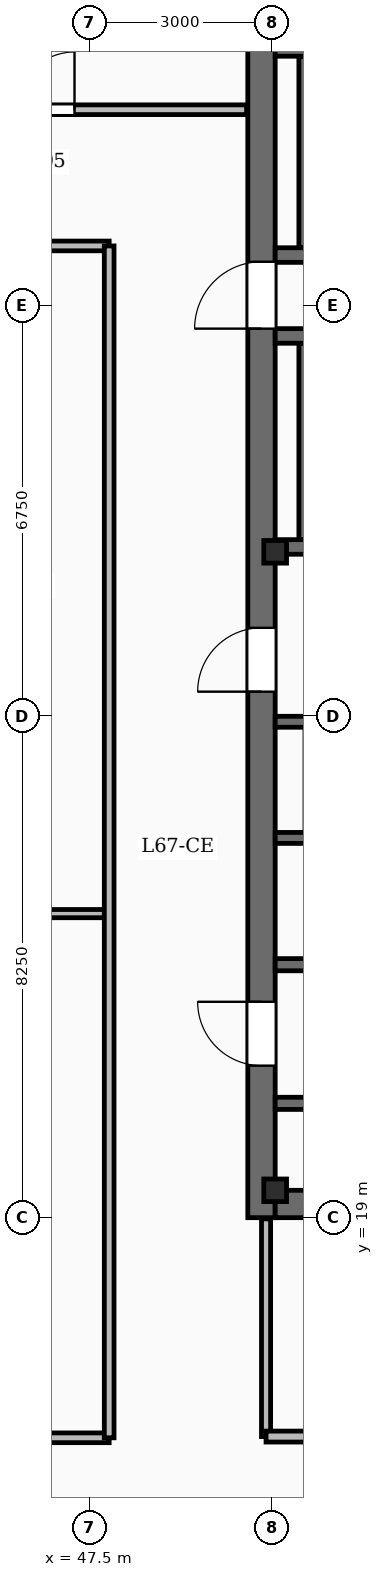
"""IFC4 building model, lengths in metres.
Left out: names, types, materials, properties, quantities, classifications, styles, units other than length and angle.
Written with IfcOpenShell. Run it as: python <this file> out.ifc"""

import sys

from ifc_helpers import new_model, si_unit, direction, frame, frame_2d, origin, origin_2d, place, context, subcontext, project, spatial, rectangle, i_section, extrude, element, fill, save


model = new_model("IFC4")
c1 = context("Model", 3, precision=1e-05, world=origin(), true_north=direction((0.0, 1.0)))
c2 = subcontext(c1, "Body", "Model", "MODEL_VIEW")
j1 = project(units=[si_unit("LENGTHUNIT", "METRE"), si_unit("PLANEANGLEUNIT", "RADIAN")], contexts=[c1])
p1 = place(None, origin())
s1 = spatial("IfcSite", under=j1, at=p1, CompositionType="ELEMENT")
p2 = place(p1, origin())
s2 = spatial("IfcBuilding", under=s1, at=p2, CompositionType="ELEMENT")
p3 = place(p2, frame((0.0, 0.0, 274.9)))
s3 = spatial("IfcBuildingStorey", under=s2, at=p3, CompositionType="ELEMENT", Elevation=274.9)
p4 = place(p3, frame((50.325, 19.0, -0.45), z_axis=(0.0, 0.0, 1.0), x_axis=(0.0, 1.0, 0.0)))
e1 = element("IfcWall", 1, at=p4, inside=s3, PredefinedType="SHEAR", context=c2, shape_type="SweptSolid", body=[
    extrude(rectangle(XDim=20.8, YDim=0.45, at=frame_2d((10.4, 0.0))), origin(), (0.0, 0.0, 1.0), 3.93),
])
p5 = place(p4, frame((2.5, 0.0, 0.45)))
e2 = element("IfcOpeningElement", 2, at=p5, cuts=e1, PredefinedType="OPENING", context=c2, shape_type="SweptSolid", body=[
    extrude(rectangle(XDim=1.05, YDim=2.15, at=frame_2d((0.525, 1.075))), frame((0.0, 0.235, 0.0), z_axis=(0.0, -1.0, 0.0), x_axis=(1.0, 0.0, 0.0)), (0.0, 0.0, 1.0), 0.47),
])
p6 = place(p4, frame((8.65, 0.0, 0.45)))
e3 = element("IfcOpeningElement", 3, at=p6, cuts=e1, PredefinedType="OPENING", context=c2, shape_type="SweptSolid", body=[
    extrude(rectangle(XDim=1.05, YDim=2.15, at=frame_2d((0.525, 1.075))), frame((0.0, 0.235, 0.0), z_axis=(0.0, -1.0, 0.0), x_axis=(1.0, 0.0, 0.0)), (0.0, 0.0, 1.0), 0.47),
])
p7 = place(p4, frame((14.62, 0.0, 0.45)))
e4 = element("IfcOpeningElement", 4, at=p7, cuts=e1, PredefinedType="OPENING", context=c2, shape_type="SweptSolid", body=[
    extrude(rectangle(XDim=1.1, YDim=2.15, at=frame_2d((0.55, 1.075))), frame((0.0, 0.235, 0.0), z_axis=(0.0, -1.0, 0.0), x_axis=(1.0, 0.0, 0.0)), (0.0, 0.0, 1.0), 0.47),
])
p8 = place(p3, frame((50.55, 19.225, -0.45), z_axis=(0.0, 0.0, 1.0), x_axis=(1.0, 0.0, 0.0)))
e5 = element("IfcWall", 5, at=p8, inside=s3, PredefinedType="SHEAR", context=c2, shape_type="SweptSolid", body=[
    extrude(rectangle(XDim=9.8, YDim=0.45, at=frame_2d((4.9, 0.0))), origin(), (0.0, 0.0, 1.0), 3.93),
])
for number, where, z_axis, x_axis in (
    (6, (50.55, 19.45, -0.45), (0.0, 0.0, 1.0), (1.0, 0.0, 0.0)),
    (7, (50.55, 29.95, -0.45), (0.0, 0.0, 1.0), (1.0, 0.0, 0.0)),
):
    element("IfcColumn", number, at=place(p3, frame(where, z_axis=z_axis, x_axis=x_axis)), inside=s3, PredefinedType="COLUMN", context=c2, shape_type="SweptSolid", body=[
        extrude(i_section(OverallWidth=0.374, OverallDepth=0.372, WebThickness=0.016, FlangeThickness=0.026, FilletRadius=0.02, at=origin_2d()), origin(), (0.0, 0.0, 1.0), 3.93),
    ])
p9 = place(p3, frame((60.35, 30.03, 0.0), z_axis=(0.0, 0.0, 1.0), x_axis=(-1.0, 0.0, 0.0)))
e8 = element("IfcWall", 8, at=p9, inside=s3, PredefinedType="SOLIDWALL", context=c2, shape_type="SweptSolid", body=[
    extrude(rectangle(XDim=9.8, YDim=0.24, at=frame_2d((4.9, 0.0))), origin(), (0.0, 0.0, 1.0), 3.48),
])
p10 = place(p9, frame((7.83, 0.0, 0.0)))
e9 = element("IfcOpeningElement", 9, at=p10, cuts=e8, PredefinedType="OPENING", context=c2, shape_type="SweptSolid", body=[
    extrude(rectangle(XDim=1.1, YDim=2.15, at=frame_2d((0.55, 1.075))), frame((0.0, 0.13, 0.0), z_axis=(0.0, -1.0, 0.0), x_axis=(1.0, 0.0, 0.0)), (0.0, 0.0, 1.0), 0.26),
])
p11 = place(p3, frame((50.55, 33.5, 0.0), z_axis=(0.0, 0.0, 1.0), x_axis=(1.0, 0.0, 0.0)))
e10 = element("IfcWall", 10, at=p11, inside=s3, PredefinedType="SOLIDWALL", context=c2, shape_type="SweptSolid", body=[
    extrude(rectangle(XDim=9.8, YDim=0.24, at=frame_2d((4.9, 0.0))), origin(), (0.0, 0.0, 1.0), 3.48),
])
p12 = place(p3, frame((51.06, 30.15, 0.0), z_axis=(0.0, 0.0, 1.0), x_axis=(0.0, 1.0, 0.0)))
e11 = element("IfcWall", 11, at=p12, inside=s3, PredefinedType="SOLIDWALL", context=c2, shape_type="SweptSolid", body=[
    extrude(rectangle(XDim=3.23, YDim=0.24, at=frame_2d((1.615, 0.0))), origin(), (0.0, 0.0, 1.0), 3.48),
])
p13 = place(p3, frame((60.35, 34.83, 0.0), z_axis=(0.0, 0.0, 1.0), x_axis=(-1.0, 0.0, 0.0)))
e12 = element("IfcWall", 12, at=p13, inside=s3, PredefinedType="SOLIDWALL", context=c2, shape_type="SweptSolid", body=[
    extrude(rectangle(XDim=9.8, YDim=0.24, at=frame_2d((4.9, 0.0))), origin(), (0.0, 0.0, 1.0), 3.48),
])
p14 = place(p13, frame((7.87, 0.0, 0.0)))
e13 = element("IfcOpeningElement", 13, at=p14, cuts=e12, PredefinedType="OPENING", context=c2, shape_type="SweptSolid", body=[
    extrude(rectangle(XDim=1.1, YDim=2.15, at=frame_2d((0.55, 1.075))), frame((0.0, 0.13, 0.0), z_axis=(0.0, -1.0, 0.0), x_axis=(1.0, 0.0, 0.0)), (0.0, 0.0, 1.0), 0.26),
])
p15 = place(p3, frame((50.55, 38.22, 0.0), z_axis=(0.0, 0.0, 1.0), x_axis=(1.0, 0.0, 0.0)))
e14 = element("IfcWall", 14, at=p15, inside=s3, PredefinedType="SOLIDWALL", context=c2, shape_type="SweptSolid", body=[
    extrude(rectangle(XDim=9.8, YDim=0.24, at=frame_2d((4.9, 0.0))), origin(), (0.0, 0.0, 1.0), 3.48),
])
p16 = place(p3, frame((51.06, 34.95, 0.0), z_axis=(0.0, 0.0, 1.0), x_axis=(0.0, 1.0, 0.0)))
e15 = element("IfcWall", 15, at=p16, inside=s3, PredefinedType="SOLIDWALL", context=c2, shape_type="SweptSolid", body=[
    extrude(rectangle(XDim=3.15, YDim=0.24, at=frame_2d((1.575, 0.0))), origin(), (0.0, 0.0, 1.0), 3.48),
])
p17 = place(p3, frame((50.55, 27.155, 0.0), z_axis=(0.0, 0.0, 1.0), x_axis=(1.0, 0.0, 0.0)))
e16 = element("IfcWall", 16, at=p17, inside=s3, PredefinedType="SOLIDWALL", context=c2, shape_type="SweptSolid", body=[
    extrude(rectangle(XDim=3.315, YDim=0.18, at=frame_2d((1.657, 0.0))), origin(), (0.0, 0.0, 1.0), 3.48),
])
p18 = place(p17, frame((1.235, 0.0, 0.0)))
e17 = element("IfcOpeningElement", 17, at=p18, cuts=e16, PredefinedType="OPENING", context=c2, shape_type="SweptSolid", body=[
    extrude(rectangle(XDim=1.35, YDim=2.3, at=frame_2d((0.675, 1.15))), frame((0.0, 0.1, 0.0), z_axis=(0.0, -1.0, 0.0), x_axis=(1.0, 0.0, 0.0)), (0.0, 0.0, 1.0), 0.2),
])
p19 = place(p3, frame((50.55, 25.245, 0.0), z_axis=(0.0, 0.0, 1.0), x_axis=(1.0, 0.0, 0.0)))
e18 = element("IfcWall", 18, at=p19, inside=s3, PredefinedType="SOLIDWALL", context=c2, shape_type="SweptSolid", body=[
    extrude(rectangle(XDim=3.315, YDim=0.18, at=frame_2d((1.657, 0.0))), origin(), (0.0, 0.0, 1.0), 3.48),
])
p20 = place(p3, frame((50.55, 20.88, 0.0), z_axis=(0.0, 0.0, 1.0), x_axis=(1.0, 0.0, 0.0)))
e19 = element("IfcWall", 19, at=p20, inside=s3, PredefinedType="SOLIDWALL", context=c2, shape_type="SweptSolid", body=[
    extrude(rectangle(XDim=9.8, YDim=0.2, at=frame_2d((4.9, 0.0))), origin(), (0.0, 0.0, 1.0), 2.54),
])
p21 = place(p20, frame((1.4, 0.0, 0.0)))
e20 = element("IfcOpeningElement", 20, at=p21, cuts=e19, PredefinedType="OPENING", context=c2, shape_type="SweptSolid", body=[
    extrude(rectangle(XDim=1.05, YDim=2.15, at=frame_2d((0.525, 1.075))), frame((0.0, 0.11, 0.0), z_axis=(0.0, -1.0, 0.0), x_axis=(1.0, 0.0, 0.0)), (0.0, 0.0, 1.0), 0.22),
])
p22 = place(p20, frame((5.5, 0.0, 0.0)))
e21 = element("IfcOpeningElement", 21, at=p22, cuts=e19, PredefinedType="OPENING", context=c2, shape_type="SweptSolid", body=[
    extrude(rectangle(XDim=1.05, YDim=2.15, at=frame_2d((0.525, 1.075))), frame((0.0, 0.11, 0.0), z_axis=(0.0, -1.0, 0.0), x_axis=(1.0, 0.0, 0.0)), (0.0, 0.0, 1.0), 0.22),
])
p23 = place(p3, frame((50.55, 23.16, 0.0), z_axis=(0.0, 0.0, 1.0), x_axis=(1.0, 0.0, 0.0)))
e22 = element("IfcWall", 22, at=p23, inside=s3, PredefinedType="SOLIDWALL", context=c2, shape_type="SweptSolid", body=[
    extrude(rectangle(XDim=3.33, YDim=0.2, at=frame_2d((1.665, 0.0))), origin(), (0.0, 0.0, 1.0), 2.54),
])
p24 = place(p23, frame((0.55, 0.0, 0.0)))
e23 = element("IfcOpeningElement", 23, at=p24, cuts=e22, PredefinedType="OPENING", context=c2, shape_type="SweptSolid", body=[
    extrude(rectangle(XDim=0.86, YDim=2.05, at=frame_2d((0.43, 1.025))), frame((0.0, 0.11, 0.0), z_axis=(0.0, -1.0, 0.0), x_axis=(1.0, 0.0, 0.0)), (0.0, 0.0, 1.0), 0.22),
])
p25 = place(p3, frame((50.4, 15.4, 0.0), z_axis=(0.0, 0.0, 1.0), x_axis=(1.0, 0.0, 0.0)))
e24 = element("IfcWall", 24, at=p25, inside=s3, PredefinedType="SOLIDWALL", context=c2, shape_type="SweptSolid", body=[
    extrude(rectangle(XDim=10.0, YDim=0.18, at=frame_2d((5.0, 0.0))), origin(), (0.0, 0.0, 1.0), 2.54),
])
p26 = place(p25, frame((1.19, 0.0, 0.0)))
e25 = element("IfcOpeningElement", 25, at=p26, cuts=e24, PredefinedType="OPENING", context=c2, shape_type="SweptSolid", body=[
    extrude(rectangle(XDim=0.92, YDim=2.1, at=frame_2d((0.46, 1.05))), frame((0.0, 0.1, 0.0), z_axis=(0.0, -1.0, 0.0), x_axis=(1.0, 0.0, 0.0)), (0.0, 0.0, 1.0), 0.2),
])
p27 = place(p25, frame((4.54, 0.0, 0.0)))
e26 = element("IfcOpeningElement", 26, at=p27, cuts=e24, PredefinedType="OPENING", context=c2, shape_type="SweptSolid", body=[
    extrude(rectangle(XDim=0.92, YDim=2.1, at=frame_2d((0.46, 1.05))), frame((0.0, 0.1, 0.0), z_axis=(0.0, -1.0, 0.0), x_axis=(1.0, 0.0, 0.0)), (0.0, 0.0, 1.0), 0.2),
])
p28 = place(p25, frame((7.92, 0.0, 0.0)))
e27 = element("IfcOpeningElement", 27, at=p28, cuts=e24, PredefinedType="OPENING", context=c2, shape_type="SweptSolid", body=[
    extrude(rectangle(XDim=0.86, YDim=2.05, at=frame_2d((0.43, 1.025))), frame((0.0, 0.1, 0.0), z_axis=(0.0, -1.0, 0.0), x_axis=(1.0, 0.0, 0.0)), (0.0, 0.0, 1.0), 0.2),
])
p29 = place(p3, frame((50.4, 15.4, 0.0), z_axis=(0.0, 0.0, 1.0), x_axis=(0.0, 1.0, 0.0)))
e28 = element("IfcWall", 28, at=p29, inside=s3, PredefinedType="PARTITIONING", context=c2, shape_type="SweptSolid", body=[
    extrude(rectangle(XDim=3.58, YDim=0.15, at=frame_2d((1.79, 0.0))), origin(), (0.0, 0.0, 1.0), 2.54),
])
p30 = place(p3, frame((24.82, 37.22, 0.0), z_axis=(0.0, 0.0, 1.0), x_axis=(1.0, 0.0, 0.0)))
e29 = element("IfcWall", 29, at=p30, inside=s3, PredefinedType="PARTITIONING", context=c2, shape_type="SweptSolid", body=[
    extrude(rectangle(XDim=25.26, YDim=0.16, at=frame_2d((12.63, 0.0))), origin(), (0.0, 0.0, 1.0), 2.54),
])
p31 = place(p30, frame((4.03, 0.0, 0.0)))
e30 = element("IfcOpeningElement", 30, at=p31, cuts=e29, PredefinedType="OPENING", context=c2, shape_type="SweptSolid", body=[
    extrude(rectangle(XDim=0.95, YDim=2.15, at=frame_2d((0.475, 1.075))), frame((0.0, 0.09, 0.0), z_axis=(0.0, -1.0, 0.0), x_axis=(1.0, 0.0, 0.0)), (0.0, 0.0, 1.0), 0.18),
])
p32 = place(p30, frame((13.355, 0.0, 0.0)))
e31 = element("IfcOpeningElement", 31, at=p32, cuts=e29, PredefinedType="OPENING", context=c2, shape_type="SweptSolid", body=[
    extrude(rectangle(XDim=0.95, YDim=2.15, at=frame_2d((0.475, 1.075))), frame((0.0, 0.09, 0.0), z_axis=(0.0, -1.0, 0.0), x_axis=(1.0, 0.0, 0.0)), (0.0, 0.0, 1.0), 0.18),
])
p33 = place(p30, frame((21.48, 0.0, 0.0)))
e32 = element("IfcOpeningElement", 32, at=p33, cuts=e29, PredefinedType="OPENING", context=c2, shape_type="SweptSolid", body=[
    extrude(rectangle(XDim=0.95, YDim=2.15, at=frame_2d((0.475, 1.075))), frame((0.0, 0.09, 0.0), z_axis=(0.0, -1.0, 0.0), x_axis=(1.0, 0.0, 0.0)), (0.0, 0.0, 1.0), 0.18),
])
p34 = place(p3, frame((27.08, 24.0, 0.0), z_axis=(0.0, 0.0, 1.0), x_axis=(1.0, 0.0, 0.0)))
e33 = element("IfcWall", 33, at=p34, inside=s3, PredefinedType="PARTITIONING", context=c2, shape_type="SweptSolid", body=[
    extrude(rectangle(XDim=20.74, YDim=0.135, at=frame_2d((10.37, 0.0))), origin(), (0.0, 0.0, 1.0), 2.54),
])
p35 = place(p3, frame((27.08, 34.98, 0.0), z_axis=(0.0, 0.0, 1.0), x_axis=(1.0, 0.0, 0.0)))
e34 = element("IfcWall", 34, at=p35, inside=s3, PredefinedType="PARTITIONING", context=c2, shape_type="SweptSolid", body=[
    extrude(rectangle(XDim=20.74, YDim=0.16, at=frame_2d((10.37, 0.0))), origin(), (0.0, 0.0, 1.0), 2.54),
])
p36 = place(p35, frame((0.995, 0.0, 0.0)))
e35 = element("IfcOpeningElement", 35, at=p36, cuts=e34, PredefinedType="OPENING", context=c2, shape_type="SweptSolid", body=[
    extrude(rectangle(XDim=0.95, YDim=2.15, at=frame_2d((0.475, 1.075))), frame((0.0, 0.09, 0.0), z_axis=(0.0, -1.0, 0.0), x_axis=(1.0, 0.0, 0.0)), (0.0, 0.0, 1.0), 0.18),
])
p37 = place(p35, frame((6.695, 0.0, 0.0)))
e36 = element("IfcOpeningElement", 36, at=p37, cuts=e34, PredefinedType="OPENING", context=c2, shape_type="SweptSolid", body=[
    extrude(rectangle(XDim=0.95, YDim=2.15, at=frame_2d((0.475, 1.075))), frame((0.0, 0.09, 0.0), z_axis=(0.0, -1.0, 0.0), x_axis=(1.0, 0.0, 0.0)), (0.0, 0.0, 1.0), 0.18),
])
p38 = place(p35, frame((13.945, 0.0, 0.0)))
e37 = element("IfcOpeningElement", 37, at=p38, cuts=e34, PredefinedType="OPENING", context=c2, shape_type="SweptSolid", body=[
    extrude(rectangle(XDim=0.95, YDim=2.15, at=frame_2d((0.475, 1.075))), frame((0.0, 0.09, 0.0), z_axis=(0.0, -1.0, 0.0), x_axis=(1.0, 0.0, 0.0)), (0.0, 0.0, 1.0), 0.18),
])
p39 = place(p35, frame((18.595, 0.0, 0.0)))
e38 = element("IfcOpeningElement", 38, at=p39, cuts=e34, PredefinedType="OPENING", context=c2, shape_type="SweptSolid", body=[
    extrude(rectangle(XDim=0.95, YDim=2.15, at=frame_2d((0.475, 1.075))), frame((0.0, 0.09, 0.0), z_axis=(0.0, -1.0, 0.0), x_axis=(1.0, 0.0, 0.0)), (0.0, 0.0, 1.0), 0.18),
])
p40 = place(p3, frame((27.08, 15.38, 0.0), z_axis=(0.0, 0.0, 1.0), x_axis=(1.0, 0.0, 0.0)))
e39 = element("IfcWall", 39, at=p40, inside=s3, PredefinedType="PARTITIONING", context=c2, shape_type="SweptSolid", body=[
    extrude(rectangle(XDim=20.74, YDim=0.16, at=frame_2d((10.37, 0.0))), origin(), (0.0, 0.0, 1.0), 2.54),
])
p41 = place(p40, frame((0.995, 0.0, 0.0)))
e40 = element("IfcOpeningElement", 40, at=p41, cuts=e39, PredefinedType="OPENING", context=c2, shape_type="SweptSolid", body=[
    extrude(rectangle(XDim=0.95, YDim=2.15, at=frame_2d((0.475, 1.075))), frame((0.0, 0.09, 0.0), z_axis=(0.0, -1.0, 0.0), x_axis=(1.0, 0.0, 0.0)), (0.0, 0.0, 1.0), 0.18),
])
p42 = place(p40, frame((6.695, 0.0, 0.0)))
e41 = element("IfcOpeningElement", 41, at=p42, cuts=e39, PredefinedType="OPENING", context=c2, shape_type="SweptSolid", body=[
    extrude(rectangle(XDim=0.95, YDim=2.15, at=frame_2d((0.475, 1.075))), frame((0.0, 0.09, 0.0), z_axis=(0.0, -1.0, 0.0), x_axis=(1.0, 0.0, 0.0)), (0.0, 0.0, 1.0), 0.18),
])
p43 = place(p40, frame((13.945, 0.0, 0.0)))
e42 = element("IfcOpeningElement", 42, at=p43, cuts=e39, PredefinedType="OPENING", context=c2, shape_type="SweptSolid", body=[
    extrude(rectangle(XDim=0.95, YDim=2.15, at=frame_2d((0.475, 1.075))), frame((0.0, 0.09, 0.0), z_axis=(0.0, -1.0, 0.0), x_axis=(1.0, 0.0, 0.0)), (0.0, 0.0, 1.0), 0.18),
])
p44 = place(p40, frame((18.595, 0.0, 0.0)))
e43 = element("IfcOpeningElement", 43, at=p44, cuts=e39, PredefinedType="OPENING", context=c2, shape_type="SweptSolid", body=[
    extrude(rectangle(XDim=0.95, YDim=2.15, at=frame_2d((0.475, 1.075))), frame((0.0, 0.09, 0.0), z_axis=(0.0, -1.0, 0.0), x_axis=(1.0, 0.0, 0.0)), (0.0, 0.0, 1.0), 0.18),
])
p45 = place(p3, frame((47.82, 15.38, 0.0), z_axis=(0.0, 0.0, 1.0), x_axis=(0.0, 1.0, 0.0)))
e44 = element("IfcWall", 44, at=p45, inside=s3, PredefinedType="PARTITIONING", context=c2, shape_type="SweptSolid", body=[
    extrude(rectangle(XDim=19.6, YDim=0.16, at=frame_2d((9.8, 0.0))), origin(), (0.0, 0.0, 1.0), 2.54),
])
p46 = place(p5, origin())
e45 = element("IfcDoor", 45, at=p46, inside=s3, OperationType="SINGLE_SWING_RIGHT", PredefinedType="DOOR", context=c2, shape_type="SweptSolid", body=[
    extrude(rectangle(XDim=1.05, YDim=2.15, at=frame_2d((0.525, 1.075))), frame((0.0, 0.025, 0.0), z_axis=(0.0, -1.0, 0.0), x_axis=(1.0, 0.0, 0.0)), (0.0, 0.0, 1.0), 0.05),
])
fill(e2, e45)
p47 = place(p6, origin())
e46 = element("IfcDoor", 46, at=p47, inside=s3, OperationType="SINGLE_SWING_LEFT", PredefinedType="DOOR", context=c2, shape_type="SweptSolid", body=[
    extrude(rectangle(XDim=1.05, YDim=2.15, at=frame_2d((0.525, 1.075))), frame((0.0, 0.025, 0.0), z_axis=(0.0, -1.0, 0.0), x_axis=(1.0, 0.0, 0.0)), (0.0, 0.0, 1.0), 0.05),
])
fill(e3, e46)
p48 = place(p7, origin())
e47 = element("IfcDoor", 47, at=p48, inside=s3, OperationType="SINGLE_SWING_LEFT", PredefinedType="DOOR", context=c2, shape_type="SweptSolid", body=[
    extrude(rectangle(XDim=1.1, YDim=2.15, at=frame_2d((0.55, 1.075))), frame((0.0, 0.025, 0.0), z_axis=(0.0, -1.0, 0.0), x_axis=(1.0, 0.0, 0.0)), (0.0, 0.0, 1.0), 0.05),
])
fill(e4, e47)
p49 = place(p33, origin())
e48 = element("IfcDoor", 48, at=p49, inside=s3, OperationType="SINGLE_SWING_RIGHT", PredefinedType="DOOR", context=c2, shape_type="SweptSolid", body=[
    extrude(rectangle(XDim=0.95, YDim=2.15, at=frame_2d((0.475, 1.075))), frame((0.0, 0.025, 0.0), z_axis=(0.0, -1.0, 0.0), x_axis=(1.0, 0.0, 0.0)), (0.0, 0.0, 1.0), 0.05),
])
fill(e32, e48)
save(model, sys.argv[1])
